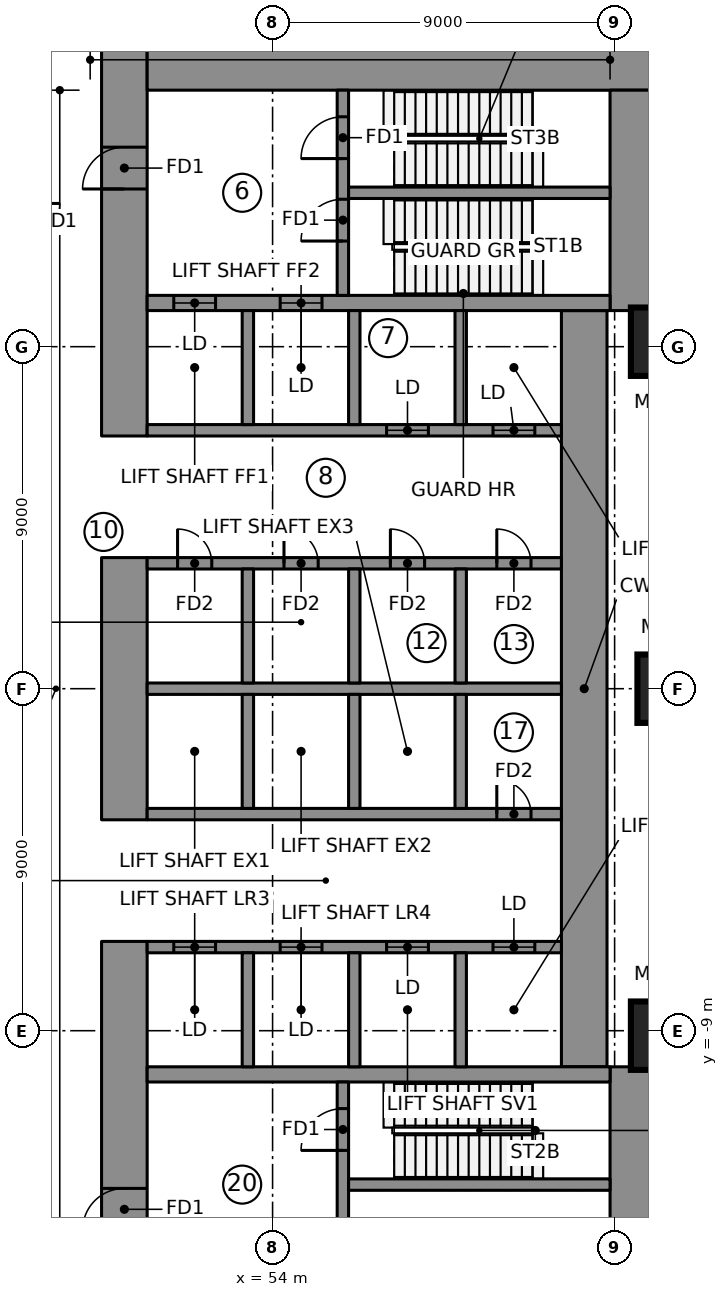
"""IFC4 building model, lengths in metres.
Left out: names, types, materials, properties, quantities, classifications, styles, units other than length and angle.
Written with IfcOpenShell. Run it as: python <this file> out.ifc"""

import sys

from ifc_helpers import new_model, si_unit, direction, frame, frame_2d, origin, origin_2d, place, context, subcontext, project, spatial, rectangle, extrude, element, fill, save


model = new_model("IFC4")
c1 = context("Model", 3, precision=1e-05, world=origin(), true_north=direction((0.0, 1.0)))
c2 = subcontext(c1, "Body", "Model", "MODEL_VIEW")
j1 = project(units=[si_unit("LENGTHUNIT", "METRE"), si_unit("PLANEANGLEUNIT", "RADIAN")], contexts=[c1])
p1 = place(None, origin())
s1 = spatial("IfcSite", under=j1, at=p1, CompositionType="ELEMENT")
p2 = place(p1, origin())
s2 = spatial("IfcBuilding", under=s1, at=p2, CompositionType="ELEMENT")
p3 = place(p2, frame((0.0, 0.0, 19.0)))
s3 = spatial("IfcBuildingStorey", under=s2, at=p3, CompositionType="ELEMENT", Elevation=19.0)
p4 = place(p3, frame((50.1, 6.65, 0.0), z_axis=(0.0, 0.0, 1.0), x_axis=(0.0, 1.0, 0.0)))
e1 = element("IfcWall", 1, at=p4, inside=s3, PredefinedType="SHEAR", context=c2, shape_type="SweptSolid", body=[
    extrude(rectangle(XDim=10.3, YDim=1.2, at=frame_2d((5.15, 0.0))), origin(), (0.0, 0.0, 1.0), 5.0),
])
p5 = place(p4, frame((6.5, 0.0, 0.0)))
e2 = element("IfcOpeningElement", 2, at=p5, cuts=e1, PredefinedType="OPENING", context=c2, shape_type="SweptSolid", body=[
    extrude(rectangle(XDim=1.1, YDim=2.1, at=frame_2d((0.55, 1.05))), frame((0.0, 0.61, 0.0), z_axis=(0.0, -1.0, 0.0), x_axis=(1.0, 0.0, 0.0)), (0.0, 0.0, 1.0), 1.22),
])
p6 = place(p3, frame((50.1, -3.45, 0.0), z_axis=(0.0, 0.0, 1.0), x_axis=(0.0, 1.0, 0.0)))
e3 = element("IfcWall", 3, at=p6, inside=s3, PredefinedType="SHEAR", context=c2, shape_type="SweptSolid", body=[
    extrude(rectangle(XDim=6.9, YDim=1.2, at=frame_2d((3.45, 0.0))), origin(), (0.0, 0.0, 1.0), 5.0),
])
p7 = place(p3, frame((50.1, -16.95, 0.0), z_axis=(0.0, 0.0, 1.0), x_axis=(0.0, 1.0, 0.0)))
e4 = element("IfcWall", 4, at=p7, inside=s3, PredefinedType="SHEAR", context=c2, shape_type="SweptSolid", body=[
    extrude(rectangle(XDim=10.3, YDim=1.2, at=frame_2d((5.15, 0.0))), origin(), (0.0, 0.0, 1.0), 5.0),
])
p8 = place(p7, frame((2.7, 0.0, 0.0)))
e5 = element("IfcOpeningElement", 5, at=p8, cuts=e4, PredefinedType="OPENING", context=c2, shape_type="SweptSolid", body=[
    extrude(rectangle(XDim=1.1, YDim=2.1, at=frame_2d((0.55, 1.05))), frame((0.0, 0.61, 0.0), z_axis=(0.0, -1.0, 0.0), x_axis=(1.0, 0.0, 0.0)), (0.0, 0.0, 1.0), 1.22),
])
p9 = place(p3, frame((50.7, 16.35, 0.0), z_axis=(0.0, 0.0, 1.0), x_axis=(1.0, 0.0, 0.0)))
e6 = element("IfcWall", 6, at=p9, inside=s3, PredefinedType="SHEAR", context=c2, shape_type="SweptSolid", body=[
    extrude(rectangle(XDim=13.38, YDim=1.2, at=frame_2d((6.69, 0.0))), origin(), (0.0, 0.0, 1.0), 5.0),
])
for number, where, z_axis, x_axis in (
    (7, (63.48, 9.95, 0.0), (0.0, 0.0, 1.0), (0.0, 1.0, 0.0)),
    (8, (63.48, -15.75, 0.0), (0.0, 0.0, 1.0), (0.0, 1.0, 0.0)),
):
    element("IfcWall", number, at=place(p3, frame(where, z_axis=z_axis, x_axis=x_axis)), inside=s3, PredefinedType="SHEAR", context=c2, shape_type="SweptSolid", body=[
        extrude(rectangle(XDim=5.8, YDim=1.2, at=frame_2d((2.9, 0.0))), origin(), (0.0, 0.0, 1.0), 5.0),
    ])
p10 = place(p3, frame((62.2, -9.95, 0.0), z_axis=(0.0, 0.0, 1.0), x_axis=(0.0, 1.0, 0.0)))
e9 = element("IfcWall", 9, at=p10, inside=s3, PredefinedType="SHEAR", context=c2, shape_type="SweptSolid", body=[
    extrude(rectangle(XDim=19.9, YDim=1.2, at=frame_2d((9.95, 0.0))), origin(), (0.0, 0.0, 1.0), 5.0),
])
p11 = place(p3, frame((50.7, 10.15, 0.0), z_axis=(0.0, 0.0, 1.0), x_axis=(1.0, 0.0, 0.0)))
e10 = element("IfcWall", 10, at=p11, inside=s3, PredefinedType="SHEAR", context=c2, shape_type="SweptSolid", body=[
    extrude(rectangle(XDim=12.18, YDim=0.4, at=frame_2d((6.09, 0.0))), origin(), (0.0, 0.0, 1.0), 5.0),
])
p12 = place(p11, frame((0.7, 0.0, 0.0)))
e11 = element("IfcOpeningElement", 11, at=p12, cuts=e10, PredefinedType="OPENING", context=c2, shape_type="SweptSolid", body=[
    extrude(rectangle(XDim=1.1, YDim=2.1, at=frame_2d((0.55, 1.05))), frame((0.0, 0.21, 0.0), z_axis=(0.0, -1.0, 0.0), x_axis=(1.0, 0.0, 0.0)), (0.0, 0.0, 1.0), 0.42),
])
p13 = place(p11, frame((3.5, 0.0, 0.0)))
e12 = element("IfcOpeningElement", 12, at=p13, cuts=e10, PredefinedType="OPENING", context=c2, shape_type="SweptSolid", body=[
    extrude(rectangle(XDim=1.1, YDim=2.1, at=frame_2d((0.55, 1.05))), frame((0.0, 0.21, 0.0), z_axis=(0.0, -1.0, 0.0), x_axis=(1.0, 0.0, 0.0)), (0.0, 0.0, 1.0), 0.42),
])
p14 = place(p3, frame((50.7, -10.15, 0.0), z_axis=(0.0, 0.0, 1.0), x_axis=(1.0, 0.0, 0.0)))
e13 = element("IfcWall", 13, at=p14, inside=s3, PredefinedType="SHEAR", context=c2, shape_type="SweptSolid", body=[
    extrude(rectangle(XDim=12.18, YDim=0.4, at=frame_2d((6.09, 0.0))), origin(), (0.0, 0.0, 1.0), 5.0),
])
p15 = place(p3, frame((50.7, 0.0, 0.0), z_axis=(0.0, 0.0, 1.0), x_axis=(1.0, 0.0, 0.0)))
e14 = element("IfcWall", 14, at=p15, inside=s3, PredefinedType="SHEAR", context=c2, shape_type="SweptSolid", body=[
    extrude(rectangle(XDim=10.9, YDim=0.3, at=frame_2d((5.45, 0.0))), origin(), (0.0, 0.0, 1.0), 5.0),
])
p16 = place(p3, frame((50.7, 3.3, 0.0), z_axis=(0.0, 0.0, 1.0), x_axis=(1.0, 0.0, 0.0)))
e15 = element("IfcWall", 15, at=p16, inside=s3, PredefinedType="SHEAR", context=c2, shape_type="SweptSolid", body=[
    extrude(rectangle(XDim=10.9, YDim=0.3, at=frame_2d((5.45, 0.0))), origin(), (0.0, 0.0, 1.0), 5.0),
])
p17 = place(p16, frame((0.8, 0.0, 0.0)))
e16 = element("IfcOpeningElement", 16, at=p17, cuts=e15, PredefinedType="OPENING", context=c2, shape_type="SweptSolid", body=[
    extrude(rectangle(XDim=0.9, YDim=2.1, at=frame_2d((0.45, 1.05))), frame((0.0, 0.16, 0.0), z_axis=(0.0, -1.0, 0.0), x_axis=(1.0, 0.0, 0.0)), (0.0, 0.0, 1.0), 0.32),
])
p18 = place(p16, frame((3.6, 0.0, 0.0)))
e17 = element("IfcOpeningElement", 17, at=p18, cuts=e15, PredefinedType="OPENING", context=c2, shape_type="SweptSolid", body=[
    extrude(rectangle(XDim=0.9, YDim=2.1, at=frame_2d((0.45, 1.05))), frame((0.0, 0.16, 0.0), z_axis=(0.0, -1.0, 0.0), x_axis=(1.0, 0.0, 0.0)), (0.0, 0.0, 1.0), 0.32),
])
p19 = place(p16, frame((6.4, 0.0, 0.0)))
e18 = element("IfcOpeningElement", 18, at=p19, cuts=e15, PredefinedType="OPENING", context=c2, shape_type="SweptSolid", body=[
    extrude(rectangle(XDim=0.9, YDim=2.1, at=frame_2d((0.45, 1.05))), frame((0.0, 0.16, 0.0), z_axis=(0.0, -1.0, 0.0), x_axis=(1.0, 0.0, 0.0)), (0.0, 0.0, 1.0), 0.32),
])
p20 = place(p16, frame((9.2, 0.0, 0.0)))
e19 = element("IfcOpeningElement", 19, at=p20, cuts=e15, PredefinedType="OPENING", context=c2, shape_type="SweptSolid", body=[
    extrude(rectangle(XDim=0.9, YDim=2.1, at=frame_2d((0.45, 1.05))), frame((0.0, 0.16, 0.0), z_axis=(0.0, -1.0, 0.0), x_axis=(1.0, 0.0, 0.0)), (0.0, 0.0, 1.0), 0.32),
])
p21 = place(p3, frame((50.7, 6.8, 0.0), z_axis=(0.0, 0.0, 1.0), x_axis=(1.0, 0.0, 0.0)))
e20 = element("IfcWall", 20, at=p21, inside=s3, PredefinedType="SHEAR", context=c2, shape_type="SweptSolid", body=[
    extrude(rectangle(XDim=10.9, YDim=0.3, at=frame_2d((5.45, 0.0))), origin(), (0.0, 0.0, 1.0), 5.0),
])
p22 = place(p21, frame((6.3, 0.0, 0.0)))
e21 = element("IfcOpeningElement", 21, at=p22, cuts=e20, PredefinedType="OPENING", context=c2, shape_type="SweptSolid", body=[
    extrude(rectangle(XDim=1.1, YDim=2.1, at=frame_2d((0.55, 1.05))), frame((0.0, 0.16, 0.0), z_axis=(0.0, -1.0, 0.0), x_axis=(1.0, 0.0, 0.0)), (0.0, 0.0, 1.0), 0.32),
])
p23 = place(p21, frame((9.1, 0.0, 0.0)))
e22 = element("IfcOpeningElement", 22, at=p23, cuts=e20, PredefinedType="OPENING", context=c2, shape_type="SweptSolid", body=[
    extrude(rectangle(XDim=1.1, YDim=2.1, at=frame_2d((0.55, 1.05))), frame((0.0, 0.16, 0.0), z_axis=(0.0, -1.0, 0.0), x_axis=(1.0, 0.0, 0.0)), (0.0, 0.0, 1.0), 0.32),
])
for number, where, z_axis, x_axis in (
    (23, (53.35, 0.15, 0.0), (0.0, 0.0, 1.0), (0.0, 1.0, 0.0)),
    (24, (53.35, 6.95, 0.0), (0.0, 0.0, 1.0), (0.0, 1.0, 0.0)),
    (25, (56.15, 0.15, 0.0), (0.0, 0.0, 1.0), (0.0, 1.0, 0.0)),
    (26, (56.15, 6.95, 0.0), (0.0, 0.0, 1.0), (0.0, 1.0, 0.0)),
    (27, (58.95, 0.15, 0.0), (0.0, 0.0, 1.0), (0.0, 1.0, 0.0)),
    (28, (58.95, 6.95, 0.0), (0.0, 0.0, 1.0), (0.0, 1.0, 0.0)),
):
    element("IfcWall", number, at=place(p3, frame(where, z_axis=z_axis, x_axis=x_axis)), inside=s3, PredefinedType="SHEAR", context=c2, shape_type="SweptSolid", body=[
        extrude(rectangle(XDim=3.0, YDim=0.3, at=frame_2d((1.5, 0.0))), origin(), (0.0, 0.0, 1.0), 5.0),
    ])
p24 = place(p3, frame((50.7, -3.3, 0.0), z_axis=(0.0, 0.0, 1.0), x_axis=(1.0, 0.0, 0.0)))
e29 = element("IfcWall", 29, at=p24, inside=s3, PredefinedType="SHEAR", context=c2, shape_type="SweptSolid", body=[
    extrude(rectangle(XDim=10.9, YDim=0.3, at=frame_2d((5.45, 0.0))), origin(), (0.0, 0.0, 1.0), 5.0),
])
p25 = place(p24, frame((9.2, 0.0, 0.0)))
e30 = element("IfcOpeningElement", 30, at=p25, cuts=e29, PredefinedType="OPENING", context=c2, shape_type="SweptSolid", body=[
    extrude(rectangle(XDim=0.9, YDim=2.1, at=frame_2d((0.45, 1.05))), frame((0.0, 0.16, 0.0), z_axis=(0.0, -1.0, 0.0), x_axis=(1.0, 0.0, 0.0)), (0.0, 0.0, 1.0), 0.32),
])
p26 = place(p3, frame((50.7, -6.8, 0.0), z_axis=(0.0, 0.0, 1.0), x_axis=(1.0, 0.0, 0.0)))
e31 = element("IfcWall", 31, at=p26, inside=s3, PredefinedType="SHEAR", context=c2, shape_type="SweptSolid", body=[
    extrude(rectangle(XDim=10.9, YDim=0.3, at=frame_2d((5.45, 0.0))), origin(), (0.0, 0.0, 1.0), 5.0),
])
p27 = place(p26, frame((0.7, 0.0, 0.0)))
e32 = element("IfcOpeningElement", 32, at=p27, cuts=e31, PredefinedType="OPENING", context=c2, shape_type="SweptSolid", body=[
    extrude(rectangle(XDim=1.1, YDim=2.1, at=frame_2d((0.55, 1.05))), frame((0.0, 0.16, 0.0), z_axis=(0.0, -1.0, 0.0), x_axis=(1.0, 0.0, 0.0)), (0.0, 0.0, 1.0), 0.32),
])
p28 = place(p26, frame((3.5, 0.0, 0.0)))
e33 = element("IfcOpeningElement", 33, at=p28, cuts=e31, PredefinedType="OPENING", context=c2, shape_type="SweptSolid", body=[
    extrude(rectangle(XDim=1.1, YDim=2.1, at=frame_2d((0.55, 1.05))), frame((0.0, 0.16, 0.0), z_axis=(0.0, -1.0, 0.0), x_axis=(1.0, 0.0, 0.0)), (0.0, 0.0, 1.0), 0.32),
])
p29 = place(p26, frame((6.3, 0.0, 0.0)))
e34 = element("IfcOpeningElement", 34, at=p29, cuts=e31, PredefinedType="OPENING", context=c2, shape_type="SweptSolid", body=[
    extrude(rectangle(XDim=1.1, YDim=2.1, at=frame_2d((0.55, 1.05))), frame((0.0, 0.16, 0.0), z_axis=(0.0, -1.0, 0.0), x_axis=(1.0, 0.0, 0.0)), (0.0, 0.0, 1.0), 0.32),
])
p30 = place(p26, frame((9.1, 0.0, 0.0)))
e35 = element("IfcOpeningElement", 35, at=p30, cuts=e31, PredefinedType="OPENING", context=c2, shape_type="SweptSolid", body=[
    extrude(rectangle(XDim=1.1, YDim=2.1, at=frame_2d((0.55, 1.05))), frame((0.0, 0.16, 0.0), z_axis=(0.0, -1.0, 0.0), x_axis=(1.0, 0.0, 0.0)), (0.0, 0.0, 1.0), 0.32),
])
for number, where, z_axis, x_axis in (
    (36, (53.35, -3.15, 0.0), (0.0, 0.0, 1.0), (0.0, 1.0, 0.0)),
    (37, (53.35, -9.95, 0.0), (0.0, 0.0, 1.0), (0.0, 1.0, 0.0)),
    (38, (56.15, -3.15, 0.0), (0.0, 0.0, 1.0), (0.0, 1.0, 0.0)),
    (39, (56.15, -9.95, 0.0), (0.0, 0.0, 1.0), (0.0, 1.0, 0.0)),
    (40, (58.95, -3.15, 0.0), (0.0, 0.0, 1.0), (0.0, 1.0, 0.0)),
    (41, (58.95, -9.95, 0.0), (0.0, 0.0, 1.0), (0.0, 1.0, 0.0)),
):
    element("IfcWall", number, at=place(p3, frame(where, z_axis=z_axis, x_axis=x_axis)), inside=s3, PredefinedType="SHEAR", context=c2, shape_type="SweptSolid", body=[
        extrude(rectangle(XDim=3.0, YDim=0.3, at=frame_2d((1.5, 0.0))), origin(), (0.0, 0.0, 1.0), 5.0),
    ])
p31 = place(p3, frame((55.85, 10.35, 0.0), z_axis=(0.0, 0.0, 1.0), x_axis=(0.0, 1.0, 0.0)))
e42 = element("IfcWall", 42, at=p31, inside=s3, PredefinedType="SHEAR", context=c2, shape_type="SweptSolid", body=[
    extrude(rectangle(XDim=5.4, YDim=0.3, at=frame_2d((2.7, 0.0))), origin(), (0.0, 0.0, 1.0), 5.0),
])
p32 = place(p31, frame((1.43, 0.0, 0.0)))
e43 = element("IfcOpeningElement", 43, at=p32, cuts=e42, PredefinedType="OPENING", context=c2, shape_type="SweptSolid", body=[
    extrude(rectangle(XDim=1.1, YDim=2.1, at=frame_2d((0.55, 1.05))), frame((0.0, 0.16, 0.0), z_axis=(0.0, -1.0, 0.0), x_axis=(1.0, 0.0, 0.0)), (0.0, 0.0, 1.0), 0.32),
])
p33 = place(p31, frame((3.6, 0.0, 0.0)))
e44 = element("IfcOpeningElement", 44, at=p33, cuts=e42, PredefinedType="OPENING", context=c2, shape_type="SweptSolid", body=[
    extrude(rectangle(XDim=1.1, YDim=2.1, at=frame_2d((0.55, 1.05))), frame((0.0, 0.16, 0.0), z_axis=(0.0, -1.0, 0.0), x_axis=(1.0, 0.0, 0.0)), (0.0, 0.0, 1.0), 0.32),
])
p34 = place(p3, frame((55.85, -15.75, 0.0), z_axis=(0.0, 0.0, 1.0), x_axis=(0.0, 1.0, 0.0)))
e45 = element("IfcWall", 45, at=p34, inside=s3, PredefinedType="SHEAR", context=c2, shape_type="SweptSolid", body=[
    extrude(rectangle(XDim=5.4, YDim=0.3, at=frame_2d((2.7, 0.0))), origin(), (0.0, 0.0, 1.0), 5.0),
])
p35 = place(p34, frame((3.6, 0.0, 0.0)))
e46 = element("IfcOpeningElement", 46, at=p35, cuts=e45, PredefinedType="OPENING", context=c2, shape_type="SweptSolid", body=[
    extrude(rectangle(XDim=1.1, YDim=2.1, at=frame_2d((0.55, 1.05))), frame((0.0, 0.16, 0.0), z_axis=(0.0, -1.0, 0.0), x_axis=(1.0, 0.0, 0.0)), (0.0, 0.0, 1.0), 0.32),
])
p36 = place(p34, frame((0.8, 0.0, 0.0)))
e47 = element("IfcOpeningElement", 47, at=p36, cuts=e45, PredefinedType="OPENING", context=c2, shape_type="SweptSolid", body=[
    extrude(rectangle(XDim=0.9, YDim=2.1, at=frame_2d((0.45, 1.05))), frame((0.0, 0.16, 0.0), z_axis=(0.0, -1.0, 0.0), x_axis=(1.0, 0.0, 0.0)), (0.0, 0.0, 1.0), 0.32),
])
for number, where, z_axis, x_axis in (
    (48, (56.0, 13.05, 0.0), (0.0, 0.0, 1.0), (1.0, 0.0, 0.0)),
    (49, (56.0, -13.05, 0.0), (0.0, 0.0, 1.0), (1.0, 0.0, 0.0)),
):
    element("IfcWall", number, at=place(p3, frame(where, z_axis=z_axis, x_axis=x_axis)), inside=s3, PredefinedType="SHEAR", context=c2, shape_type="SweptSolid", body=[
        extrude(rectangle(XDim=6.88, YDim=0.3, at=frame_2d((3.44, 0.0))), origin(), (0.0, 0.0, 1.0), 5.0),
    ])
for number, where, z_axis, x_axis in (
    (50, (64.328, -9.131, 0.0), (0.0, 0.0, 1.0), (1.0, 0.0, 0.0)),
    (51, (64.5, 0.0, 0.0), (0.0, 0.0, 1.0), (1.0, 0.0, 0.0)),
    (52, (64.328, 9.131, 0.0), (0.0, 0.0, 1.0), (1.0, 0.0, 0.0)),
):
    element("IfcColumn", number, at=place(p3, frame(where, z_axis=z_axis, x_axis=x_axis)), inside=s3, PredefinedType="COLUMN", context=c2, shape_type="SweptSolid", body=[
        extrude(rectangle(XDim=1.8, YDim=1.8, at=origin_2d()), origin(), (0.0, 0.0, 1.0), 5.0),
    ])
p37 = place(p12, origin())
e53 = element("IfcDoor", 53, at=p37, inside=s3, OperationType="DOUBLE_DOOR_SLIDING", PredefinedType="DOOR", context=c2, shape_type="SweptSolid", body=[
    extrude(rectangle(XDim=1.1, YDim=2.1, at=frame_2d((0.55, 1.05))), frame((0.0, 0.025, 0.0), z_axis=(0.0, -1.0, 0.0), x_axis=(1.0, 0.0, 0.0)), (0.0, 0.0, 1.0), 0.05),
])
fill(e11, e53)
p38 = place(p13, origin())
e54 = element("IfcDoor", 54, at=p38, inside=s3, OperationType="DOUBLE_DOOR_SLIDING", PredefinedType="DOOR", context=c2, shape_type="SweptSolid", body=[
    extrude(rectangle(XDim=1.1, YDim=2.1, at=frame_2d((0.55, 1.05))), frame((0.0, 0.025, 0.0), z_axis=(0.0, -1.0, 0.0), x_axis=(1.0, 0.0, 0.0)), (0.0, 0.0, 1.0), 0.05),
])
fill(e12, e54)
p39 = place(p22, origin())
e55 = element("IfcDoor", 55, at=p39, inside=s3, OperationType="DOUBLE_DOOR_SLIDING", PredefinedType="DOOR", context=c2, shape_type="SweptSolid", body=[
    extrude(rectangle(XDim=1.1, YDim=2.1, at=frame_2d((0.55, 1.05))), frame((0.0, 0.025, 0.0), z_axis=(0.0, -1.0, 0.0), x_axis=(1.0, 0.0, 0.0)), (0.0, 0.0, 1.0), 0.05),
])
fill(e21, e55)
p40 = place(p23, origin())
e56 = element("IfcDoor", 56, at=p40, inside=s3, OperationType="DOUBLE_DOOR_SLIDING", PredefinedType="DOOR", context=c2, shape_type="SweptSolid", body=[
    extrude(rectangle(XDim=1.1, YDim=2.1, at=frame_2d((0.55, 1.05))), frame((0.0, 0.025, 0.0), z_axis=(0.0, -1.0, 0.0), x_axis=(1.0, 0.0, 0.0)), (0.0, 0.0, 1.0), 0.05),
])
fill(e22, e56)
p41 = place(p27, origin())
e57 = element("IfcDoor", 57, at=p41, inside=s3, OperationType="DOUBLE_DOOR_SLIDING", PredefinedType="DOOR", context=c2, shape_type="SweptSolid", body=[
    extrude(rectangle(XDim=1.1, YDim=2.1, at=frame_2d((0.55, 1.05))), frame((0.0, 0.025, 0.0), z_axis=(0.0, -1.0, 0.0), x_axis=(1.0, 0.0, 0.0)), (0.0, 0.0, 1.0), 0.05),
])
fill(e32, e57)
p42 = place(p28, origin())
e58 = element("IfcDoor", 58, at=p42, inside=s3, OperationType="DOUBLE_DOOR_SLIDING", PredefinedType="DOOR", context=c2, shape_type="SweptSolid", body=[
    extrude(rectangle(XDim=1.1, YDim=2.1, at=frame_2d((0.55, 1.05))), frame((0.0, 0.025, 0.0), z_axis=(0.0, -1.0, 0.0), x_axis=(1.0, 0.0, 0.0)), (0.0, 0.0, 1.0), 0.05),
])
fill(e33, e58)
p43 = place(p29, origin())
e59 = element("IfcDoor", 59, at=p43, inside=s3, OperationType="DOUBLE_DOOR_SLIDING", PredefinedType="DOOR", context=c2, shape_type="SweptSolid", body=[
    extrude(rectangle(XDim=1.1, YDim=2.1, at=frame_2d((0.55, 1.05))), frame((0.0, 0.025, 0.0), z_axis=(0.0, -1.0, 0.0), x_axis=(1.0, 0.0, 0.0)), (0.0, 0.0, 1.0), 0.05),
])
fill(e34, e59)
p44 = place(p30, origin())
e60 = element("IfcDoor", 60, at=p44, inside=s3, OperationType="DOUBLE_DOOR_SLIDING", PredefinedType="DOOR", context=c2, shape_type="SweptSolid", body=[
    extrude(rectangle(XDim=1.1, YDim=2.1, at=frame_2d((0.55, 1.05))), frame((0.0, 0.025, 0.0), z_axis=(0.0, -1.0, 0.0), x_axis=(1.0, 0.0, 0.0)), (0.0, 0.0, 1.0), 0.05),
])
fill(e35, e60)
p45 = place(p32, origin())
e61 = element("IfcDoor", 61, at=p45, inside=s3, OperationType="SINGLE_SWING_RIGHT", PredefinedType="DOOR", context=c2, shape_type="SweptSolid", body=[
    extrude(rectangle(XDim=1.1, YDim=2.1, at=frame_2d((0.55, 1.05))), frame((0.0, 0.025, 0.0), z_axis=(0.0, -1.0, 0.0), x_axis=(1.0, 0.0, 0.0)), (0.0, 0.0, 1.0), 0.05),
])
fill(e43, e61)
p46 = place(p33, origin())
e62 = element("IfcDoor", 62, at=p46, inside=s3, OperationType="SINGLE_SWING_RIGHT", PredefinedType="DOOR", context=c2, shape_type="SweptSolid", body=[
    extrude(rectangle(XDim=1.1, YDim=2.1, at=frame_2d((0.55, 1.05))), frame((0.0, 0.025, 0.0), z_axis=(0.0, -1.0, 0.0), x_axis=(1.0, 0.0, 0.0)), (0.0, 0.0, 1.0), 0.05),
])
fill(e44, e62)
p47 = place(p35, origin())
e63 = element("IfcDoor", 63, at=p47, inside=s3, OperationType="SINGLE_SWING_RIGHT", PredefinedType="DOOR", context=c2, shape_type="SweptSolid", body=[
    extrude(rectangle(XDim=1.1, YDim=2.1, at=frame_2d((0.55, 1.05))), frame((0.0, 0.025, 0.0), z_axis=(0.0, -1.0, 0.0), x_axis=(1.0, 0.0, 0.0)), (0.0, 0.0, 1.0), 0.05),
])
fill(e46, e63)
p48 = place(p5, origin())
e64 = element("IfcDoor", 64, at=p48, inside=s3, OperationType="SINGLE_SWING_RIGHT", PredefinedType="DOOR", context=c2, shape_type="SweptSolid", body=[
    extrude(rectangle(XDim=1.1, YDim=2.1, at=frame_2d((0.55, 1.05))), frame((0.0, 0.025, 0.0), z_axis=(0.0, -1.0, 0.0), x_axis=(1.0, 0.0, 0.0)), (0.0, 0.0, 1.0), 0.05),
])
fill(e2, e64)
p49 = place(p8, origin())
e65 = element("IfcDoor", 65, at=p49, inside=s3, OperationType="SINGLE_SWING_RIGHT", PredefinedType="DOOR", context=c2, shape_type="SweptSolid", body=[
    extrude(rectangle(XDim=1.1, YDim=2.1, at=frame_2d((0.55, 1.05))), frame((0.0, 0.025, 0.0), z_axis=(0.0, -1.0, 0.0), x_axis=(1.0, 0.0, 0.0)), (0.0, 0.0, 1.0), 0.05),
])
fill(e5, e65)
p50 = place(p17, origin())
e66 = element("IfcDoor", 66, at=p50, inside=s3, OperationType="SINGLE_SWING_LEFT", PredefinedType="DOOR", context=c2, shape_type="SweptSolid", body=[
    extrude(rectangle(XDim=0.9, YDim=2.1, at=frame_2d((0.45, 1.05))), frame((0.0, 0.025, 0.0), z_axis=(0.0, -1.0, 0.0), x_axis=(1.0, 0.0, 0.0)), (0.0, 0.0, 1.0), 0.05),
])
fill(e16, e66)
p51 = place(p18, origin())
e67 = element("IfcDoor", 67, at=p51, inside=s3, OperationType="SINGLE_SWING_LEFT", PredefinedType="DOOR", context=c2, shape_type="SweptSolid", body=[
    extrude(rectangle(XDim=0.9, YDim=2.1, at=frame_2d((0.45, 1.05))), frame((0.0, 0.025, 0.0), z_axis=(0.0, -1.0, 0.0), x_axis=(1.0, 0.0, 0.0)), (0.0, 0.0, 1.0), 0.05),
])
fill(e17, e67)
p52 = place(p19, origin())
e68 = element("IfcDoor", 68, at=p52, inside=s3, OperationType="SINGLE_SWING_LEFT", PredefinedType="DOOR", context=c2, shape_type="SweptSolid", body=[
    extrude(rectangle(XDim=0.9, YDim=2.1, at=frame_2d((0.45, 1.05))), frame((0.0, 0.025, 0.0), z_axis=(0.0, -1.0, 0.0), x_axis=(1.0, 0.0, 0.0)), (0.0, 0.0, 1.0), 0.05),
])
fill(e18, e68)
p53 = place(p20, origin())
e69 = element("IfcDoor", 69, at=p53, inside=s3, OperationType="SINGLE_SWING_LEFT", PredefinedType="DOOR", context=c2, shape_type="SweptSolid", body=[
    extrude(rectangle(XDim=0.9, YDim=2.1, at=frame_2d((0.45, 1.05))), frame((0.0, 0.025, 0.0), z_axis=(0.0, -1.0, 0.0), x_axis=(1.0, 0.0, 0.0)), (0.0, 0.0, 1.0), 0.05),
])
fill(e19, e69)
p54 = place(p25, origin())
e70 = element("IfcDoor", 70, at=p54, inside=s3, OperationType="SINGLE_SWING_LEFT", PredefinedType="DOOR", context=c2, shape_type="SweptSolid", body=[
    extrude(rectangle(XDim=0.9, YDim=2.1, at=frame_2d((0.45, 1.05))), frame((0.0, 0.025, 0.0), z_axis=(0.0, -1.0, 0.0), x_axis=(1.0, 0.0, 0.0)), (0.0, 0.0, 1.0), 0.05),
])
fill(e30, e70)
save(model, sys.argv[1])
